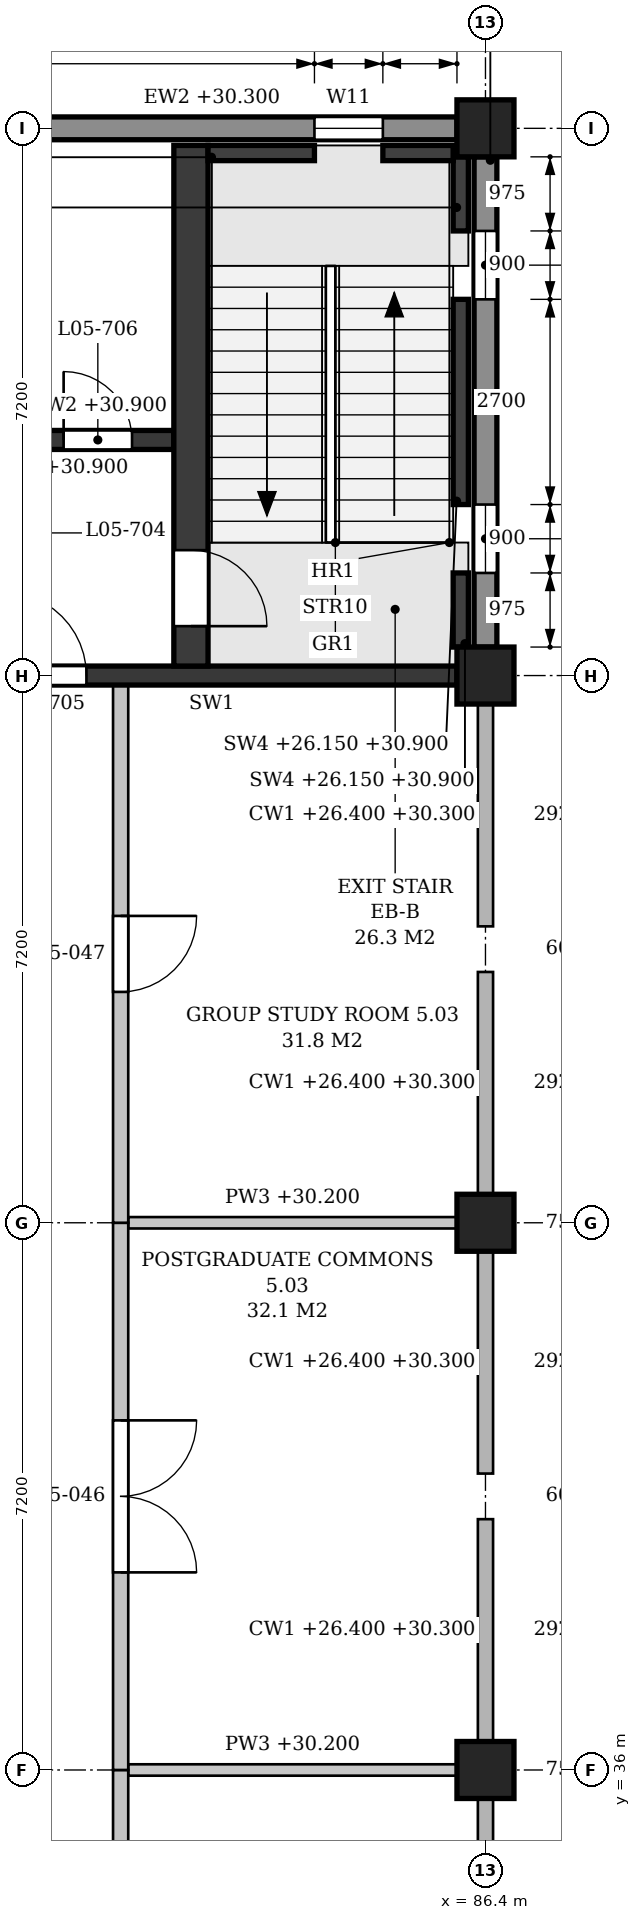
"""IFC4 building model, lengths in metres.
Left out: names, types, materials, properties, quantities, classifications, styles, units other than length and angle.
Written with IfcOpenShell. Run it as: python <this file> out.ifc"""

import sys

from ifc_helpers import new_model, si_unit, direction, frame, frame_2d, origin, origin_2d, place, context, subcontext, project, spatial, polyline, rectangle, outline, extrude, element, fill, save


model = new_model("IFC4")
c1 = context("Model", 3, precision=1e-05, world=origin(), true_north=direction((0.0, 1.0)))
c2 = subcontext(c1, "Body", "Model", "MODEL_VIEW")
j1 = project(units=[si_unit("LENGTHUNIT", "METRE"), si_unit("PLANEANGLEUNIT", "RADIAN")], contexts=[c1])
p1 = place(None, origin())
s1 = spatial("IfcSite", under=j1, at=p1, CompositionType="ELEMENT")
p2 = place(p1, origin())
s2 = spatial("IfcBuilding", under=s1, at=p2, CompositionType="ELEMENT")
p3 = place(p2, frame((0.0, 0.0, 26.4)))
s3 = spatial("IfcBuildingStorey", under=s2, at=p3, CompositionType="ELEMENT", Elevation=26.4)
for number, where, z_axis, x_axis in (
    (1, (86.4, 36.0, 0.0), (0.0, 0.0, 1.0), (1.0, 0.0, 0.0)),
    (2, (86.4, 43.2, 0.0), (0.0, 0.0, 1.0), (1.0, 0.0, 0.0)),
    (3, (86.4, 50.4, 0.0), (0.0, 0.0, 1.0), (1.0, 0.0, 0.0)),
    (4, (86.4, 57.6, 0.0), (0.0, 0.0, 1.0), (1.0, 0.0, 0.0)),
):
    element("IfcColumn", number, at=place(p3, frame(where, z_axis=z_axis, x_axis=x_axis)), inside=s3, PredefinedType="COLUMN", context=c2, shape_type="SweptSolid", body=[
        extrude(rectangle(XDim=0.75, YDim=0.75, at=origin_2d()), origin(), (0.0, 0.0, 1.0), 4.8),
    ])
p4 = place(p3, frame((86.4, 50.775, 0.0), z_axis=(0.0, 0.0, 1.0), x_axis=(0.0, 1.0, 0.0)))
e5 = element("IfcWall", 5, at=p4, inside=s3, PredefinedType="STANDARD", context=c2, shape_type="SweptSolid", body=[
    extrude(rectangle(XDim=6.45, YDim=0.3, at=frame_2d((3.225, 0.0))), origin(), (0.0, 0.0, 1.0), 3.9),
])
p5 = place(p4, frame((0.975, 0.0, 0.9)))
e6 = element("IfcOpeningElement", 6, at=p5, cuts=e5, PredefinedType="OPENING", context=c2, shape_type="SweptSolid", body=[
    extrude(outline(polyline([(0.0, 0.0), (0.9, 0.0), (0.9, 2.05), (0.45, 2.5), (0.0, 2.05), (0.0, 0.0)])), frame((0.0, 0.16, 0.0), z_axis=(0.0, -1.0, 0.0), x_axis=(1.0, 0.0, 0.0)), (0.0, 0.0, 1.0), 0.32),
])
p6 = place(p4, frame((4.575, 0.0, 0.9)))
e7 = element("IfcOpeningElement", 7, at=p6, cuts=e5, PredefinedType="OPENING", context=c2, shape_type="SweptSolid", body=[
    extrude(outline(polyline([(0.0, 0.0), (0.9, 0.0), (0.9, 2.05), (0.45, 2.5), (0.0, 2.05), (0.0, 0.0)])), frame((0.0, 0.16, 0.0), z_axis=(0.0, -1.0, 0.0), x_axis=(1.0, 0.0, 0.0)), (0.0, 0.0, 1.0), 0.32),
])
p7 = place(p3, frame((86.025, 57.6, 0.0), z_axis=(0.0, 0.0, 1.0), x_axis=(-1.0, 0.0, 0.0)))
e8 = element("IfcWall", 8, at=p7, inside=s3, PredefinedType="STANDARD", context=c2, shape_type="SweptSolid", body=[
    extrude(rectangle(XDim=6.45, YDim=0.3, at=frame_2d((3.225, 0.0))), origin(), (0.0, 0.0, 1.0), 3.9),
])
p8 = place(p7, frame((0.975, 0.0, 0.9)))
e9 = element("IfcOpeningElement", 9, at=p8, cuts=e8, PredefinedType="OPENING", context=c2, shape_type="SweptSolid", body=[
    extrude(outline(polyline([(0.0, 0.0), (0.9, 0.0), (0.9, 2.05), (0.45, 2.5), (0.0, 2.05), (0.0, 0.0)])), frame((0.0, 0.16, 0.0), z_axis=(0.0, -1.0, 0.0), x_axis=(1.0, 0.0, 0.0)), (0.0, 0.0, 1.0), 0.32),
])
p9 = place(p3, frame((79.575, 50.4, 0.0), z_axis=(0.0, 0.0, 1.0), x_axis=(1.0, 0.0, 0.0)))
e10 = element("IfcWall", 10, at=p9, inside=s3, PredefinedType="SHEAR", context=c2, shape_type="SweptSolid", body=[
    extrude(rectangle(XDim=6.45, YDim=0.25, at=frame_2d((3.225, 0.0))), origin(), (0.0, 0.0, 1.0), 3.85),
])
p10 = place(p9, frame((0.475, 0.0, 0.0)))
e11 = element("IfcOpeningElement", 11, at=p10, cuts=e10, PredefinedType="OPENING", context=c2, shape_type="SweptSolid", body=[
    extrude(rectangle(XDim=1.1, YDim=2.1, at=frame_2d((0.55, 1.05))), frame((0.0, 0.135, 0.0), z_axis=(0.0, -1.0, 0.0), x_axis=(1.0, 0.0, 0.0)), (0.0, 0.0, 1.0), 0.27),
])
p11 = place(p3, frame((86.075, 50.775, -0.25), z_axis=(0.0, 0.0, 1.0), x_axis=(0.0, 1.0, 0.0)))
e12 = element("IfcWall", 12, at=p11, inside=s3, PredefinedType="SHEAR", context=c2, shape_type="SweptSolid", body=[
    extrude(rectangle(XDim=0.975, YDim=0.2, at=frame_2d((0.488, 0.0))), origin(), (0.0, 0.0, 1.0), 4.75),
])
p12 = place(p3, frame((86.075, 52.65, -0.25), z_axis=(0.0, 0.0, 1.0), x_axis=(0.0, 1.0, 0.0)))
e13 = element("IfcWall", 13, at=p12, inside=s3, PredefinedType="SHEAR", context=c2, shape_type="SweptSolid", body=[
    extrude(rectangle(XDim=2.7, YDim=0.2, at=frame_2d((1.35, 0.0))), origin(), (0.0, 0.0, 1.0), 4.75),
])
p13 = place(p3, frame((86.075, 56.25, -0.25), z_axis=(0.0, 0.0, 1.0), x_axis=(0.0, 1.0, 0.0)))
e14 = element("IfcWall", 14, at=p13, inside=s3, PredefinedType="SHEAR", context=c2, shape_type="SweptSolid", body=[
    extrude(rectangle(XDim=0.975, YDim=0.2, at=frame_2d((0.488, 0.0))), origin(), (0.0, 0.0, 1.0), 4.75),
])
p14 = place(p3, frame((82.75, 57.275, -0.25), z_axis=(0.0, 0.0, 1.0), x_axis=(1.0, 0.0, 0.0)))
e15 = element("IfcWall", 15, at=p14, inside=s3, PredefinedType="SHEAR", context=c2, shape_type="SweptSolid", body=[
    extrude(rectangle(XDim=1.4, YDim=0.2, at=frame_2d((0.7, 0.0))), origin(), (0.0, 0.0, 1.0), 4.75),
])
p15 = place(p3, frame((85.05, 57.275, -0.25), z_axis=(0.0, 0.0, 1.0), x_axis=(1.0, 0.0, 0.0)))
e16 = element("IfcWall", 16, at=p15, inside=s3, PredefinedType="SHEAR", context=c2, shape_type="SweptSolid", body=[
    extrude(rectangle(XDim=0.925, YDim=0.2, at=frame_2d((0.462, 0.0))), origin(), (0.0, 0.0, 1.0), 4.75),
])
p16 = place(p3, frame((82.525, 50.525, 0.0), z_axis=(0.0, 0.0, 1.0), x_axis=(0.0, 1.0, 0.0)))
e17 = element("IfcWall", 17, at=p16, inside=s3, PredefinedType="SHEAR", context=c2, shape_type="SweptSolid", body=[
    extrude(rectangle(XDim=6.85, YDim=0.45, at=frame_2d((3.425, 0.0))), origin(), (0.0, 0.0, 1.0), 4.5),
])
p17 = place(p16, frame((0.525, 0.0, 0.0)))
e18 = element("IfcOpeningElement", 18, at=p17, cuts=e17, PredefinedType="OPENING", context=c2, shape_type="SweptSolid", body=[
    extrude(rectangle(XDim=1.0, YDim=2.1, at=frame_2d((0.5, 1.05))), frame((0.0, 0.235, 0.0), z_axis=(0.0, -1.0, 0.0), x_axis=(1.0, 0.0, 0.0)), (0.0, 0.0, 1.0), 0.47),
])
p18 = place(p3, frame((79.325, 53.5, 0.0), z_axis=(0.0, 0.0, 1.0), x_axis=(1.0, 0.0, 0.0)))
e19 = element("IfcWall", 19, at=p18, inside=s3, PredefinedType="SHEAR", context=c2, shape_type="SweptSolid", body=[
    extrude(rectangle(XDim=2.975, YDim=0.25, at=frame_2d((1.488, 0.0))), origin(), (0.0, 0.0, 1.0), 4.5),
])
p19 = place(p18, frame((1.525, 0.0, 0.0)))
e20 = element("IfcOpeningElement", 20, at=p19, cuts=e19, PredefinedType="OPENING", context=c2, shape_type="SweptSolid", body=[
    extrude(rectangle(XDim=0.9, YDim=2.1, at=frame_2d((0.45, 1.05))), frame((0.0, 0.135, 0.0), z_axis=(0.0, -1.0, 0.0), x_axis=(1.0, 0.0, 0.0)), (0.0, 0.0, 1.0), 0.27),
])
for number, where, z_axis, x_axis in (
    (21, (81.7, 36.0, 0.0), (0.0, 0.0, 1.0), (1.0, 0.0, 0.0)),
    (22, (81.7, 43.2, 0.0), (0.0, 0.0, 1.0), (1.0, 0.0, 0.0)),
):
    element("IfcWall", number, at=place(p3, frame(where, z_axis=z_axis, x_axis=x_axis)), inside=s3, PredefinedType="PARTITIONING", context=c2, shape_type="SweptSolid", body=[
        extrude(rectangle(XDim=4.325, YDim=0.15, at=frame_2d((2.163, 0.0))), origin(), (0.0, 0.0, 1.0), 3.8),
    ])
p20 = place(p3, frame((81.6, 28.8, 0.0), z_axis=(0.0, 0.0, 1.0), x_axis=(0.0, 1.0, 0.0)))
e23 = element("IfcWall", 23, at=p20, inside=s3, PredefinedType="PARTITIONING", context=c2, shape_type="SweptSolid", body=[
    extrude(outline(polyline([(0.0, 0.0), (7.2, 0.0), (7.2, 3.85), (6.975, 3.85), (6.975, 4.5), (0.225, 4.5), (0.225, 3.85), (0.0, 3.85), (0.0, 0.0)])), frame((0.0, 0.1, 0.0), z_axis=(0.0, -1.0, 0.0), x_axis=(1.0, 0.0, 0.0)), (0.0, 0.0, 1.0), 0.2),
])
p21 = place(p20, frame((3.1, 0.0, 0.0)))
e24 = element("IfcOpeningElement", 24, at=p21, cuts=e23, PredefinedType="OPENING", context=c2, shape_type="SweptSolid", body=[
    extrude(rectangle(XDim=1.0, YDim=2.1, at=frame_2d((0.5, 1.05))), frame((0.0, 0.11, 0.0), z_axis=(0.0, -1.0, 0.0), x_axis=(1.0, 0.0, 0.0)), (0.0, 0.0, 1.0), 0.22),
])
p22 = place(p3, frame((81.6, 36.0, 0.0), z_axis=(0.0, 0.0, 1.0), x_axis=(0.0, 1.0, 0.0)))
e25 = element("IfcWall", 25, at=p22, inside=s3, PredefinedType="PARTITIONING", context=c2, shape_type="SweptSolid", body=[
    extrude(outline(polyline([(0.0, 0.0), (7.2, 0.0), (7.2, 3.85), (6.975, 3.85), (6.975, 4.5), (0.225, 4.5), (0.225, 3.85), (0.0, 3.85), (0.0, 0.0)])), frame((0.0, 0.1, 0.0), z_axis=(0.0, -1.0, 0.0), x_axis=(1.0, 0.0, 0.0)), (0.0, 0.0, 1.0), 0.2),
])
p23 = place(p22, frame((2.6, 0.0, 0.0)))
e26 = element("IfcOpeningElement", 26, at=p23, cuts=e25, PredefinedType="OPENING", context=c2, shape_type="SweptSolid", body=[
    extrude(rectangle(XDim=2.0, YDim=2.1, at=frame_2d((1.0, 1.05))), frame((0.0, 0.11, 0.0), z_axis=(0.0, -1.0, 0.0), x_axis=(1.0, 0.0, 0.0)), (0.0, 0.0, 1.0), 0.22),
])
p24 = place(p3, frame((81.6, 43.2, 0.0), z_axis=(0.0, 0.0, 1.0), x_axis=(0.0, 1.0, 0.0)))
e27 = element("IfcWall", 27, at=p24, inside=s3, PredefinedType="PARTITIONING", context=c2, shape_type="SweptSolid", body=[
    extrude(outline(polyline([(0.0, 0.0), (7.075, 0.0), (7.075, 3.85), (6.975, 3.85), (6.975, 4.5), (0.225, 4.5), (0.225, 3.85), (0.0, 3.85), (0.0, 0.0)])), frame((0.0, 0.1, 0.0), z_axis=(0.0, -1.0, 0.0), x_axis=(1.0, 0.0, 0.0)), (0.0, 0.0, 1.0), 0.2),
])
p25 = place(p24, frame((3.038, 0.0, 0.0)))
e28 = element("IfcOpeningElement", 28, at=p25, cuts=e27, PredefinedType="OPENING", context=c2, shape_type="SweptSolid", body=[
    extrude(rectangle(XDim=1.0, YDim=2.1, at=frame_2d((0.5, 1.05))), frame((0.0, 0.11, 0.0), z_axis=(0.0, -1.0, 0.0), x_axis=(1.0, 0.0, 0.0)), (0.0, 0.0, 1.0), 0.22),
])
p26 = place(p5, origin())
e29 = element("IfcWindow", 29, at=p26, inside=s3, PartitioningType="SINGLE_PANEL", PredefinedType="WINDOW", context=c2, shape_type="SweptSolid", body=[
    extrude(outline(polyline([(0.0, 0.0), (0.9, 0.0), (0.9, 2.05), (0.45, 2.5), (0.0, 2.05), (0.0, 0.0)])), frame((0.0, 0.03, 0.0), z_axis=(0.0, -1.0, 0.0), x_axis=(1.0, 0.0, 0.0)), (0.0, 0.0, 1.0), 0.06),
])
fill(e6, e29)
p27 = place(p6, origin())
e30 = element("IfcWindow", 30, at=p27, inside=s3, PartitioningType="SINGLE_PANEL", PredefinedType="WINDOW", context=c2, shape_type="SweptSolid", body=[
    extrude(outline(polyline([(0.0, 0.0), (0.9, 0.0), (0.9, 2.05), (0.45, 2.5), (0.0, 2.05), (0.0, 0.0)])), frame((0.0, 0.03, 0.0), z_axis=(0.0, -1.0, 0.0), x_axis=(1.0, 0.0, 0.0)), (0.0, 0.0, 1.0), 0.06),
])
fill(e7, e30)
p28 = place(p8, origin())
e31 = element("IfcWindow", 31, at=p28, inside=s3, PartitioningType="SINGLE_PANEL", PredefinedType="WINDOW", context=c2, shape_type="SweptSolid", body=[
    extrude(outline(polyline([(0.0, 0.0), (0.9, 0.0), (0.9, 2.05), (0.45, 2.5), (0.0, 2.05), (0.0, 0.0)])), frame((0.0, 0.03, 0.0), z_axis=(0.0, -1.0, 0.0), x_axis=(1.0, 0.0, 0.0)), (0.0, 0.0, 1.0), 0.06),
])
fill(e9, e31)
p29 = place(p17, frame((1.0, 0.0, 0.0), z_axis=(0.0, 0.0, 1.0), x_axis=(-1.0, 0.0, 0.0)))
e32 = element("IfcDoor", 32, at=p29, inside=s3, OperationType="SINGLE_SWING_RIGHT", PredefinedType="DOOR", context=c2, shape_type="SweptSolid", body=[
    extrude(rectangle(XDim=1.0, YDim=2.1, at=frame_2d((0.5, 1.05))), frame((0.0, 0.025, 0.0), z_axis=(0.0, -1.0, 0.0), x_axis=(1.0, 0.0, 0.0)), (0.0, 0.0, 1.0), 0.05),
])
fill(e18, e32)
p30 = place(p10, origin())
e33 = element("IfcDoor", 33, at=p30, inside=s3, OperationType="SINGLE_SWING_LEFT", PredefinedType="DOOR", context=c2, shape_type="SweptSolid", body=[
    extrude(rectangle(XDim=1.1, YDim=2.1, at=frame_2d((0.55, 1.05))), frame((0.0, 0.025, 0.0), z_axis=(0.0, -1.0, 0.0), x_axis=(1.0, 0.0, 0.0)), (0.0, 0.0, 1.0), 0.05),
])
fill(e11, e33)
p31 = place(p19, origin())
e34 = element("IfcDoor", 34, at=p31, inside=s3, OperationType="SINGLE_SWING_LEFT", PredefinedType="DOOR", context=c2, shape_type="SweptSolid", body=[
    extrude(rectangle(XDim=0.9, YDim=2.1, at=frame_2d((0.45, 1.05))), frame((0.0, 0.025, 0.0), z_axis=(0.0, -1.0, 0.0), x_axis=(1.0, 0.0, 0.0)), (0.0, 0.0, 1.0), 0.05),
])
fill(e20, e34)
p32 = place(p23, origin())
e35 = element("IfcDoor", 35, at=p32, inside=s3, OperationType="DOUBLE_DOOR_SINGLE_SWING", PredefinedType="DOOR", context=c2, shape_type="SweptSolid", body=[
    extrude(rectangle(XDim=2.0, YDim=2.1, at=frame_2d((1.0, 1.05))), frame((0.0, 0.025, 0.0), z_axis=(0.0, -1.0, 0.0), x_axis=(1.0, 0.0, 0.0)), (0.0, 0.0, 1.0), 0.05),
])
fill(e26, e35)
p33 = place(p25, frame((1.0, 0.0, 0.0), z_axis=(0.0, 0.0, 1.0), x_axis=(-1.0, 0.0, 0.0)))
e36 = element("IfcDoor", 36, at=p33, inside=s3, OperationType="SINGLE_SWING_LEFT", PredefinedType="DOOR", context=c2, shape_type="SweptSolid", body=[
    extrude(rectangle(XDim=1.0, YDim=2.1, at=frame_2d((0.5, 1.05))), frame((0.0, 0.025, 0.0), z_axis=(0.0, -1.0, 0.0), x_axis=(1.0, 0.0, 0.0)), (0.0, 0.0, 1.0), 0.05),
])
fill(e28, e36)
save(model, sys.argv[1])
